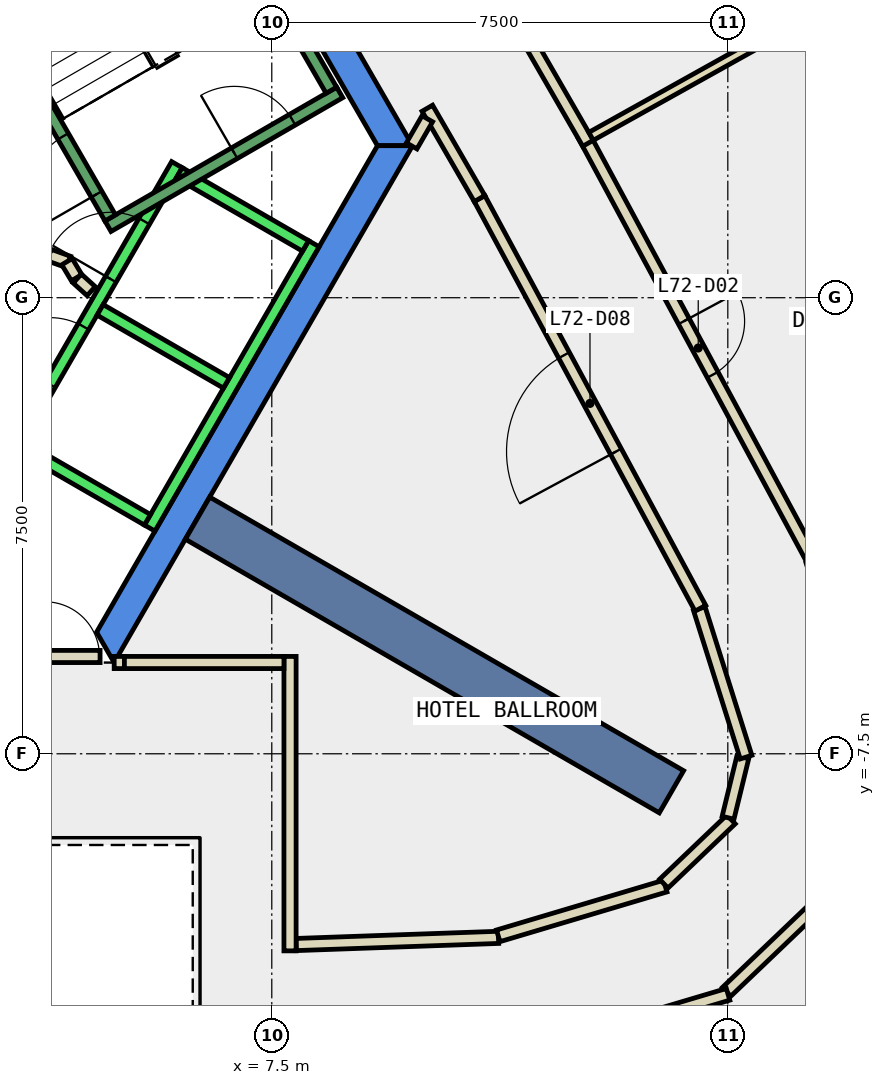
"""IFC4 building model, lengths in metres.
Left out: names, types, materials, properties, quantities, classifications, styles, units other than length and angle.
Written with IfcOpenShell. Run it as: python <this file> out.ifc"""

import sys

from ifc_helpers import new_model, si_unit, direction, frame, frame_2d, origin, place, context, subcontext, project, spatial, polyline, rectangle, outline, extrude, element, fill, save


model = new_model("IFC4")
c1 = context("Model", 3, precision=1e-05, world=origin(), true_north=direction((0.0, 1.0)))
c2 = subcontext(c1, "Body", "Model", "MODEL_VIEW")
j1 = project(units=[si_unit("LENGTHUNIT", "METRE"), si_unit("PLANEANGLEUNIT", "RADIAN")], contexts=[c1])
p1 = place(None, origin())
s1 = spatial("IfcSite", under=j1, at=p1, CompositionType="ELEMENT")
p2 = place(p1, origin())
s2 = spatial("IfcBuilding", under=s1, at=p2, CompositionType="ELEMENT")
p3 = place(p2, frame((0.0, 0.0, 308.0)))
s3 = spatial("IfcBuildingStorey", under=s2, at=p3, CompositionType="ELEMENT", Elevation=308.0)
p4 = place(p3, frame((0.0, 0.0, -0.34)))
e1 = element("IfcWall", 1, at=p4, inside=s3, PredefinedType="SHEAR", context=c2, shape_type="SweptSolid", body=[
    extrude(outline(polyline([(5.486, 9.998), (5.053, 9.748), (9.238, 2.5), (9.815, 2.5), (5.486, 9.998)])), origin(), (0.0, 0.0, 1.0), 3.6),
])
p5 = place(p3, frame((0.0, 0.0, -0.34)))
e2 = element("IfcWall", 2, at=p5, inside=s3, PredefinedType="SHEAR", context=c2, shape_type="SweptSolid", body=[
    extrude(outline(polyline([(4.907, -6.0), (9.815, 2.5), (9.238, 2.5), (4.619, -5.5), (4.907, -6.0)])), origin(), (0.0, 0.0, 1.0), 3.6),
])
p6 = place(p3, frame((6.279, -3.625, -0.34), z_axis=(0.0, 0.0, 1.0), x_axis=(0.866017533419, -0.500013631625, 0.0)))
e3 = element("IfcWall", 3, at=p6, inside=s3, PredefinedType="SHEAR", context=c2, shape_type="SweptSolid", body=[
    extrude(rectangle(XDim=9.0, YDim=0.8, at=frame_2d((4.5, 0.0))), origin(), (0.0, 0.0, 1.0), 3.6),
])
p7 = place(p3, frame((7.9, -10.637, 0.0), z_axis=(0.0, 0.0, 1.0), x_axis=(0.999372900517, 0.035409119054, 0.0)))
e4 = element("IfcWall", 4, at=p7, inside=s3, PredefinedType="PARTITIONING", context=c2, shape_type="SweptSolid", body=[
    extrude(rectangle(XDim=3.33, YDim=0.2, at=frame_2d((1.665, 0.0))), origin(), (0.0, 0.0, 1.0), 3.26),
])
p8 = place(p3, frame((11.224, -10.494, 0.0), z_axis=(0.0, 0.0, 1.0), x_axis=(0.958417413979, 0.285370041492, 0.0)))
e5 = element("IfcWall", 5, at=p8, inside=s3, PredefinedType="PARTITIONING", context=c2, shape_type="SweptSolid", body=[
    extrude(rectangle(XDim=2.866, YDim=0.2, at=frame_2d((1.433, 0.0))), origin(), (0.0, 0.0, 1.0), 3.26),
])
p9 = place(p3, frame((13.947, -9.636, 0.0), z_axis=(0.0, 0.0, 1.0), x_axis=(0.723283043556, 0.690551691696, 0.0)))
e6 = element("IfcWall", 6, at=p9, inside=s3, PredefinedType="PARTITIONING", context=c2, shape_type="SweptSolid", body=[
    extrude(rectangle(XDim=1.529, YDim=0.2, at=frame_2d((0.765, 0.0))), origin(), (0.0, 0.0, 1.0), 3.26),
])
p10 = place(p3, frame((15.004, -8.552, 0.0), z_axis=(0.0, 0.0, 1.0), x_axis=(0.237373129266, 0.971418549083, 0.0)))
e7 = element("IfcWall", 7, at=p10, inside=s3, PredefinedType="PARTITIONING", context=c2, shape_type="SweptSolid", body=[
    extrude(rectangle(XDim=1.024, YDim=0.2, at=frame_2d((0.512, 0.0))), origin(), (0.0, 0.0, 1.0), 3.26),
])
p11 = place(p3, frame((15.3, -7.555, 0.0), z_axis=(0.0, 0.0, 1.0), x_axis=(-0.300501248013, 0.953781421471, 0.0)))
e8 = element("IfcWall", 8, at=p11, inside=s3, PredefinedType="PARTITIONING", context=c2, shape_type="SweptSolid", body=[
    extrude(rectangle(XDim=2.559, YDim=0.2, at=frame_2d((1.28, 0.0))), origin(), (0.0, 0.0, 1.0), 3.26),
])
p12 = place(p3, frame((14.549, -5.107, 0.0), z_axis=(0.0, 0.0, 1.0), x_axis=(-0.47449538478, 0.880257990491, 0.0)))
e9 = element("IfcWall", 9, at=p12, inside=s3, PredefinedType="PARTITIONING", context=c2, shape_type="SweptSolid", body=[
    extrude(rectangle(XDim=7.655, YDim=0.2, at=frame_2d((3.827, 0.0))), origin(), (0.0, 0.0, 1.0), 3.26),
])
p13 = place(p12, frame((2.927, 0.0, 0.0)))
e10 = element("IfcOpeningElement", 10, at=p13, cuts=e9, PredefinedType="OPENING", context=c2, shape_type="SweptSolid", body=[
    extrude(rectangle(XDim=1.8, YDim=2.1, at=frame_2d((0.9, 1.05))), frame((0.0, 0.11, 0.0), z_axis=(0.0, -1.0, 0.0), x_axis=(1.0, 0.0, 0.0)), (0.0, 0.0, 1.0), 0.22),
])
p14 = place(p3, frame((10.917, 1.631, 0.0), z_axis=(0.0, 0.0, 1.0), x_axis=(-0.500699613169, 0.865621104972, 0.0)))
e11 = element("IfcWall", 11, at=p14, inside=s3, PredefinedType="PARTITIONING", context=c2, shape_type="SweptSolid", body=[
    extrude(rectangle(XDim=1.715, YDim=0.2, at=frame_2d((0.858, 0.0))), origin(), (0.0, 0.0, 1.0), 3.26),
])
p15 = place(p3, frame((10.058, 2.943, 0.0), z_axis=(0.0, 0.0, 1.0), x_axis=(-0.499352927503, -0.866398669086, 0.0)))
e12 = element("IfcWall", 12, at=p15, inside=s3, PredefinedType="PARTITIONING", context=c2, shape_type="SweptSolid", body=[
    extrude(rectangle(XDim=0.515, YDim=0.2, at=frame_2d((0.257, 0.0))), origin(), (0.0, 0.0, 1.0), 3.26),
])
p16 = place(p3, frame((12.628, 2.671, 0.0), z_axis=(0.0, 0.0, 1.0), x_axis=(0.474489967676, -0.880260910512, 0.0)))
e13 = element("IfcWall", 13, at=p16, inside=s3, PredefinedType="PARTITIONING", context=c2, shape_type="SweptSolid", body=[
    extrude(rectangle(XDim=7.948, YDim=0.2, at=frame_2d((3.974, 0.0))), origin(), (0.0, 0.0, 1.0), 3.26),
])
p17 = place(p16, frame((3.474, 0.0, 0.0)))
e14 = element("IfcOpeningElement", 14, at=p17, cuts=e13, PredefinedType="OPENING", context=c2, shape_type="SweptSolid", body=[
    extrude(rectangle(XDim=1.0, YDim=2.1, at=frame_2d((0.5, 1.05))), frame((0.0, 0.11, 0.0), z_axis=(0.0, -1.0, 0.0), x_axis=(1.0, 0.0, 0.0)), (0.0, 0.0, 1.0), 0.22),
])
p18 = place(p3, frame((16.857, -9.622, 0.0), z_axis=(0.0, 0.0, 1.0), x_axis=(-0.723099256445, -0.690744138831, 0.0)))
e15 = element("IfcWall", 15, at=p18, inside=s3, PredefinedType="PARTITIONING", context=c2, shape_type="SweptSolid", body=[
    extrude(rectangle(XDim=2.596, YDim=0.2, at=frame_2d((1.298, 0.0))), origin(), (0.0, 0.0, 1.0), 3.26),
])
p19 = place(p3, frame((15.004, -11.456, 0.0), z_axis=(0.0, 0.0, 1.0), x_axis=(-0.958459796003, -0.285227662485, 0.0)))
e16 = element("IfcWall", 16, at=p19, inside=s3, PredefinedType="PARTITIONING", context=c2, shape_type="SweptSolid", body=[
    extrude(rectangle(XDim=3.604, YDim=0.2, at=frame_2d((1.802, 0.0))), origin(), (0.0, 0.0, 1.0), 3.26),
])
p20 = place(p3, frame((8.588, 9.665, 0.0), z_axis=(0.0, 0.0, 1.0), x_axis=(0.499946799636, -0.86605611685, 0.0)))
e17 = element("IfcWall", 17, at=p20, inside=s3, PredefinedType="PARTITIONING", context=c2, shape_type="SweptSolid", body=[
    extrude(rectangle(XDim=8.227, YDim=0.2, at=frame_2d((4.114, 0.0))), origin(), (0.0, 0.0, 1.0), 3.26),
])
p21 = place(p20, frame((3.613, 0.0, 0.0)))
e18 = element("IfcOpeningElement", 18, at=p21, cuts=e17, PredefinedType="OPENING", context=c2, shape_type="SweptSolid", body=[
    extrude(rectangle(XDim=1.0, YDim=2.1, at=frame_2d((0.5, 1.05))), frame((0.0, 0.11, 0.0), z_axis=(0.0, -1.0, 0.0), x_axis=(1.0, 0.0, 0.0)), (0.0, 0.0, 1.0), 0.22),
])
p22 = place(p3, frame((3.838, 0.702, 0.0), z_axis=(0.0, 0.0, 1.0), x_axis=(0.941035081519, -0.338308993895, 0.0)))
e19 = element("IfcWall", 19, at=p22, inside=s3, PredefinedType="PARTITIONING", context=c2, shape_type="SweptSolid", body=[
    extrude(rectangle(XDim=0.337, YDim=0.2, at=frame_2d((0.168, 0.0))), origin(), (0.0, 0.0, 1.0), 3.26),
])
p23 = place(p3, frame((4.132, 0.593, 0.0), z_axis=(0.0, 0.0, 1.0), x_axis=(0.513561617048, -0.858052717201, 0.0)))
e20 = element("IfcWall", 20, at=p23, inside=s3, PredefinedType="PARTITIONING", context=c2, shape_type="SweptSolid", body=[
    extrude(rectangle(XDim=0.308, YDim=0.2, at=frame_2d((0.154, 0.0))), origin(), (0.0, 0.0, 1.0), 3.26),
])
p24 = place(p3, frame((4.301, 0.315, 0.0), z_axis=(0.0, 0.0, 1.0), x_axis=(0.741798017506, -0.670623367639, 0.0)))
e21 = element("IfcWall", 21, at=p24, inside=s3, PredefinedType="PARTITIONING", context=c2, shape_type="SweptSolid", body=[
    extrude(rectangle(XDim=0.309, YDim=0.2, at=frame_2d((0.154, 0.0))), origin(), (0.0, 0.0, 1.0), 3.26),
])
p25 = place(p3, frame((4.908, -5.999, 0.0), z_axis=(0.0, 0.0, 1.0), x_axis=(1.0, 0.0, 0.0)))
e22 = element("IfcWall", 22, at=p25, inside=s3, PredefinedType="PARTITIONING", context=c2, shape_type="SweptSolid", body=[
    extrude(rectangle(XDim=0.168, YDim=0.2, at=frame_2d((0.084, 0.0))), origin(), (0.0, 0.0, 1.0), 2.4),
])
p26 = place(p3, frame((7.8, -5.899, 0.0), z_axis=(0.0, 0.0, 1.0), x_axis=(0.0, -1.0, 0.0)))
e23 = element("IfcWall", 23, at=p26, inside=s3, PredefinedType="PARTITIONING", context=c2, shape_type="SweptSolid", body=[
    extrude(rectangle(XDim=4.842, YDim=0.2, at=frame_2d((2.421, 0.0))), origin(), (0.0, 0.0, 1.0), 3.26),
])
p27 = place(p3, frame((12.751, 2.654, 0.0), z_axis=(0.0, 0.0, 1.0), x_axis=(0.873277679945, 0.487222837837, 0.0)))
e24 = element("IfcWall", 24, at=p27, inside=s3, PredefinedType="PARTITIONING", context=c2, shape_type="SweptSolid", body=[
    extrude(rectangle(XDim=4.38, YDim=0.15, at=frame_2d((2.19, 0.0))), origin(), (0.0, 0.0, 1.0), 3.26),
])
p28 = place(p3, frame((3.75, -5.9, 0.0), z_axis=(0.0, 0.0, 1.0), x_axis=(1.0, 0.0, 0.0)))
e25 = element("IfcWall", 25, at=p28, inside=s3, PredefinedType="PARTITIONING", context=c2, shape_type="SweptSolid", body=[
    extrude(rectangle(XDim=0.926, YDim=0.2, at=frame_2d((0.463, 0.0))), origin(), (0.0, 0.0, 1.0), 2.4),
])
p29 = place(p28, frame((0.017, 0.0, 0.0)))
e26 = element("IfcOpeningElement", 26, at=p29, cuts=e25, PredefinedType="OPENING", context=c2, shape_type="SweptSolid", body=[
    extrude(rectangle(XDim=0.9, YDim=2.1, at=frame_2d((0.45, 1.05))), frame((0.0, 0.11, 0.0), z_axis=(0.0, -1.0, 0.0), x_axis=(1.0, 0.0, 0.0)), (0.0, 0.0, 1.0), 0.22),
])
p30 = place(p3, frame((5.076, -5.999, 0.0), z_axis=(0.0, 0.0, 1.0), x_axis=(1.0, 0.0, 0.0)))
e27 = element("IfcWall", 27, at=p30, inside=s3, PredefinedType="PARTITIONING", context=c2, shape_type="SweptSolid", body=[
    extrude(rectangle(XDim=2.624, YDim=0.2, at=frame_2d((1.312, 0.0))), origin(), (0.0, 0.0, 1.0), 3.26),
])
p31 = place(p3, frame((3.24, -2.488, 0.0), z_axis=(0.0, 0.0, 1.0), x_axis=(0.500034260056, 0.866005622828, 0.0)))
e28 = element("IfcWall", 28, at=p31, inside=s3, PredefinedType="STANDARD", context=c2, shape_type="SweptSolid", body=[
    extrude(rectangle(XDim=5.399, YDim=0.2, at=frame_2d((2.7, 0.0))), origin(), (0.0, 0.0, 1.0), 3.26),
])
p32 = place(p31, frame((3.225, 0.0, 0.0)))
e29 = element("IfcOpeningElement", 29, at=p32, cuts=e28, PredefinedType="OPENING", context=c2, shape_type="SweptSolid", body=[
    extrude(rectangle(XDim=1.1, YDim=2.1, at=frame_2d((0.55, 1.05))), frame((0.0, 0.11, 0.0), z_axis=(0.0, -1.0, 0.0), x_axis=(1.0, 0.0, 0.0)), (0.0, 0.0, 1.0), 0.22),
])
p33 = place(p31, frame((1.225, 0.0, 0.0)))
e30 = element("IfcOpeningElement", 30, at=p33, cuts=e28, PredefinedType="OPENING", context=c2, shape_type="SweptSolid", body=[
    extrude(rectangle(XDim=1.1, YDim=2.1, at=frame_2d((0.55, 1.05))), frame((0.0, 0.11, 0.0), z_axis=(0.0, -1.0, 0.0), x_axis=(1.0, 0.0, 0.0)), (0.0, 0.0, 1.0), 0.22),
])
p34 = place(p3, frame((5.492, -3.788, 0.0), z_axis=(0.0, 0.0, 1.0), x_axis=(0.500034260056, 0.866005622828, 0.0)))
e31 = element("IfcWall", 31, at=p34, inside=s3, PredefinedType="STANDARD", context=c2, shape_type="SweptSolid", body=[
    extrude(rectangle(XDim=5.399, YDim=0.2, at=frame_2d((2.7, 0.0))), origin(), (0.0, 0.0, 1.0), 3.26),
])
p35 = place(p3, frame((3.377, -2.452, 0.0), z_axis=(0.0, 0.0, 1.0), x_axis=(0.865955154139, -0.50012165622, 0.0)))
e32 = element("IfcWall", 32, at=p35, inside=s3, PredefinedType="STANDARD", context=c2, shape_type="SweptSolid", body=[
    extrude(rectangle(XDim=2.4, YDim=0.2, at=frame_2d((1.2, 0.0))), origin(), (0.0, 0.0, 1.0), 3.26),
])
for number, where, z_axis, x_axis in (
    (33, (4.677, -0.2, 0.0), (0.0, 0.0, 1.0), (0.866, -0.5, 0.0)),
    (34, (5.977, 2.052, 0.0), (0.0, 0.0, 1.0), (0.866, -0.5, 0.0)),
):
    element("IfcWall", number, at=place(p3, frame(where, z_axis=z_axis, x_axis=x_axis)), inside=s3, PredefinedType="STANDARD", context=c2, shape_type="SweptSolid", body=[
        extrude(rectangle(XDim=2.399, YDim=0.2, at=frame_2d((1.2, 0.0))), origin(), (0.0, 0.0, 1.0), 3.26),
    ])
p36 = place(p3, frame((4.806, 1.176, 0.0), z_axis=(0.0, 0.0, 1.0), x_axis=(0.866059941101, 0.499940174841, 0.0)))
e35 = element("IfcWall", 35, at=p36, inside=s3, PredefinedType="STANDARD", context=c2, shape_type="SweptSolid", body=[
    extrude(rectangle(XDim=4.4, YDim=0.2, at=frame_2d((2.2, 0.0))), origin(), (0.0, 0.0, 1.0), 3.26),
])
p37 = place(p36, frame((2.4, 0.0, 0.0)))
e36 = element("IfcOpeningElement", 36, at=p37, cuts=e35, PredefinedType="OPENING", context=c2, shape_type="SweptSolid", body=[
    extrude(rectangle(XDim=1.1, YDim=2.2, at=frame_2d((0.55, 1.1))), frame((0.0, 0.11, 0.0), z_axis=(0.0, -1.0, 0.0), x_axis=(1.0, 0.0, 0.0)), (0.0, 0.0, 1.0), 0.22),
])
p38 = place(p3, frame((4.843, 1.312, 0.0), z_axis=(0.0, 0.0, 1.0), x_axis=(-0.499963383562, 0.866046543262, 0.0)))
e37 = element("IfcWall", 37, at=p38, inside=s3, PredefinedType="STANDARD", context=c2, shape_type="SweptSolid", body=[
    extrude(rectangle(XDim=6.9, YDim=0.2, at=frame_2d((3.45, 0.0))), origin(), (0.0, 0.0, 1.0), 3.26),
])
p39 = place(p38, frame((0.45, 0.0, 0.0)))
e38 = element("IfcOpeningElement", 38, at=p39, cuts=e37, PredefinedType="OPENING", context=c2, shape_type="SweptSolid", body=[
    extrude(rectangle(XDim=1.1, YDim=2.2, at=frame_2d((0.55, 1.1))), frame((0.0, 0.11, 0.0), z_axis=(0.0, -1.0, 0.0), x_axis=(1.0, 0.0, 0.0)), (0.0, 0.0, 1.0), 0.22),
])
p40 = place(p3, frame((8.48, 3.412, 0.0), z_axis=(0.0, 0.0, 1.0), x_axis=(-0.499978703459, 0.866037698999, 0.0)))
e39 = element("IfcWall", 39, at=p40, inside=s3, PredefinedType="STANDARD", context=c2, shape_type="SweptSolid", body=[
    extrude(rectangle(XDim=6.9, YDim=0.2, at=frame_2d((3.45, 0.0))), origin(), (0.0, 0.0, 1.0), 3.26),
])
p41 = place(p17, origin())
e40 = element("IfcDoor", 40, at=p41, inside=s3, OperationType="SINGLE_SWING_LEFT", PredefinedType="DOOR", context=c2, shape_type="SweptSolid", body=[
    extrude(rectangle(XDim=1.0, YDim=2.1, at=frame_2d((0.5, 1.05))), frame((0.0, 0.025, 0.0), z_axis=(0.0, -1.0, 0.0), x_axis=(1.0, 0.0, 0.0)), (0.0, 0.0, 1.0), 0.05),
])
fill(e14, e40)
p42 = place(p13, origin())
e41 = element("IfcDoor", 41, at=p42, inside=s3, OperationType="DOUBLE_DOOR_SINGLE_SWING", PredefinedType="DOOR", context=c2, shape_type="SweptSolid", body=[
    extrude(rectangle(XDim=1.8, YDim=2.1, at=frame_2d((0.9, 1.05))), frame((0.0, 0.025, 0.0), z_axis=(0.0, -1.0, 0.0), x_axis=(1.0, 0.0, 0.0)), (0.0, 0.0, 1.0), 0.05),
])
fill(e10, e41)
p43 = place(p29, origin())
e42 = element("IfcDoor", 42, at=p43, inside=s3, OperationType="SINGLE_SWING_LEFT", PredefinedType="DOOR", context=c2, shape_type="SweptSolid", body=[
    extrude(rectangle(XDim=0.9, YDim=2.1, at=frame_2d((0.45, 1.05))), frame((0.0, 0.025, 0.0), z_axis=(0.0, -1.0, 0.0), x_axis=(1.0, 0.0, 0.0)), (0.0, 0.0, 1.0), 0.05),
])
fill(e26, e42)
p44 = place(p32, origin())
e43 = element("IfcDoor", 43, at=p44, inside=s3, OperationType="SLIDING_TO_LEFT", PredefinedType="DOOR", context=c2, shape_type="SweptSolid", body=[
    extrude(rectangle(XDim=1.1, YDim=2.1, at=frame_2d((0.55, 1.05))), frame((0.0, 0.025, 0.0), z_axis=(0.0, -1.0, 0.0), x_axis=(1.0, 0.0, 0.0)), (0.0, 0.0, 1.0), 0.05),
])
fill(e29, e43)
p45 = place(p33, origin())
e44 = element("IfcDoor", 44, at=p45, inside=s3, OperationType="SLIDING_TO_LEFT", PredefinedType="DOOR", context=c2, shape_type="SweptSolid", body=[
    extrude(rectangle(XDim=1.1, YDim=2.1, at=frame_2d((0.55, 1.05))), frame((0.0, 0.025, 0.0), z_axis=(0.0, -1.0, 0.0), x_axis=(1.0, 0.0, 0.0)), (0.0, 0.0, 1.0), 0.05),
])
fill(e30, e44)
p46 = place(p39, origin())
e45 = element("IfcDoor", 45, at=p46, inside=s3, OperationType="SINGLE_SWING_LEFT", PredefinedType="DOOR", context=c2, shape_type="SweptSolid", body=[
    extrude(rectangle(XDim=1.1, YDim=2.2, at=frame_2d((0.55, 1.1))), frame((0.0, 0.025, 0.0), z_axis=(0.0, -1.0, 0.0), x_axis=(1.0, 0.0, 0.0)), (0.0, 0.0, 1.0), 0.05),
])
fill(e38, e45)
p47 = place(p37, origin())
e46 = element("IfcDoor", 46, at=p47, inside=s3, OperationType="SINGLE_SWING_LEFT", PredefinedType="DOOR", context=c2, shape_type="SweptSolid", body=[
    extrude(rectangle(XDim=1.1, YDim=2.2, at=frame_2d((0.55, 1.1))), frame((0.0, 0.025, 0.0), z_axis=(0.0, -1.0, 0.0), x_axis=(1.0, 0.0, 0.0)), (0.0, 0.0, 1.0), 0.05),
])
fill(e36, e46)
save(model, sys.argv[1])
